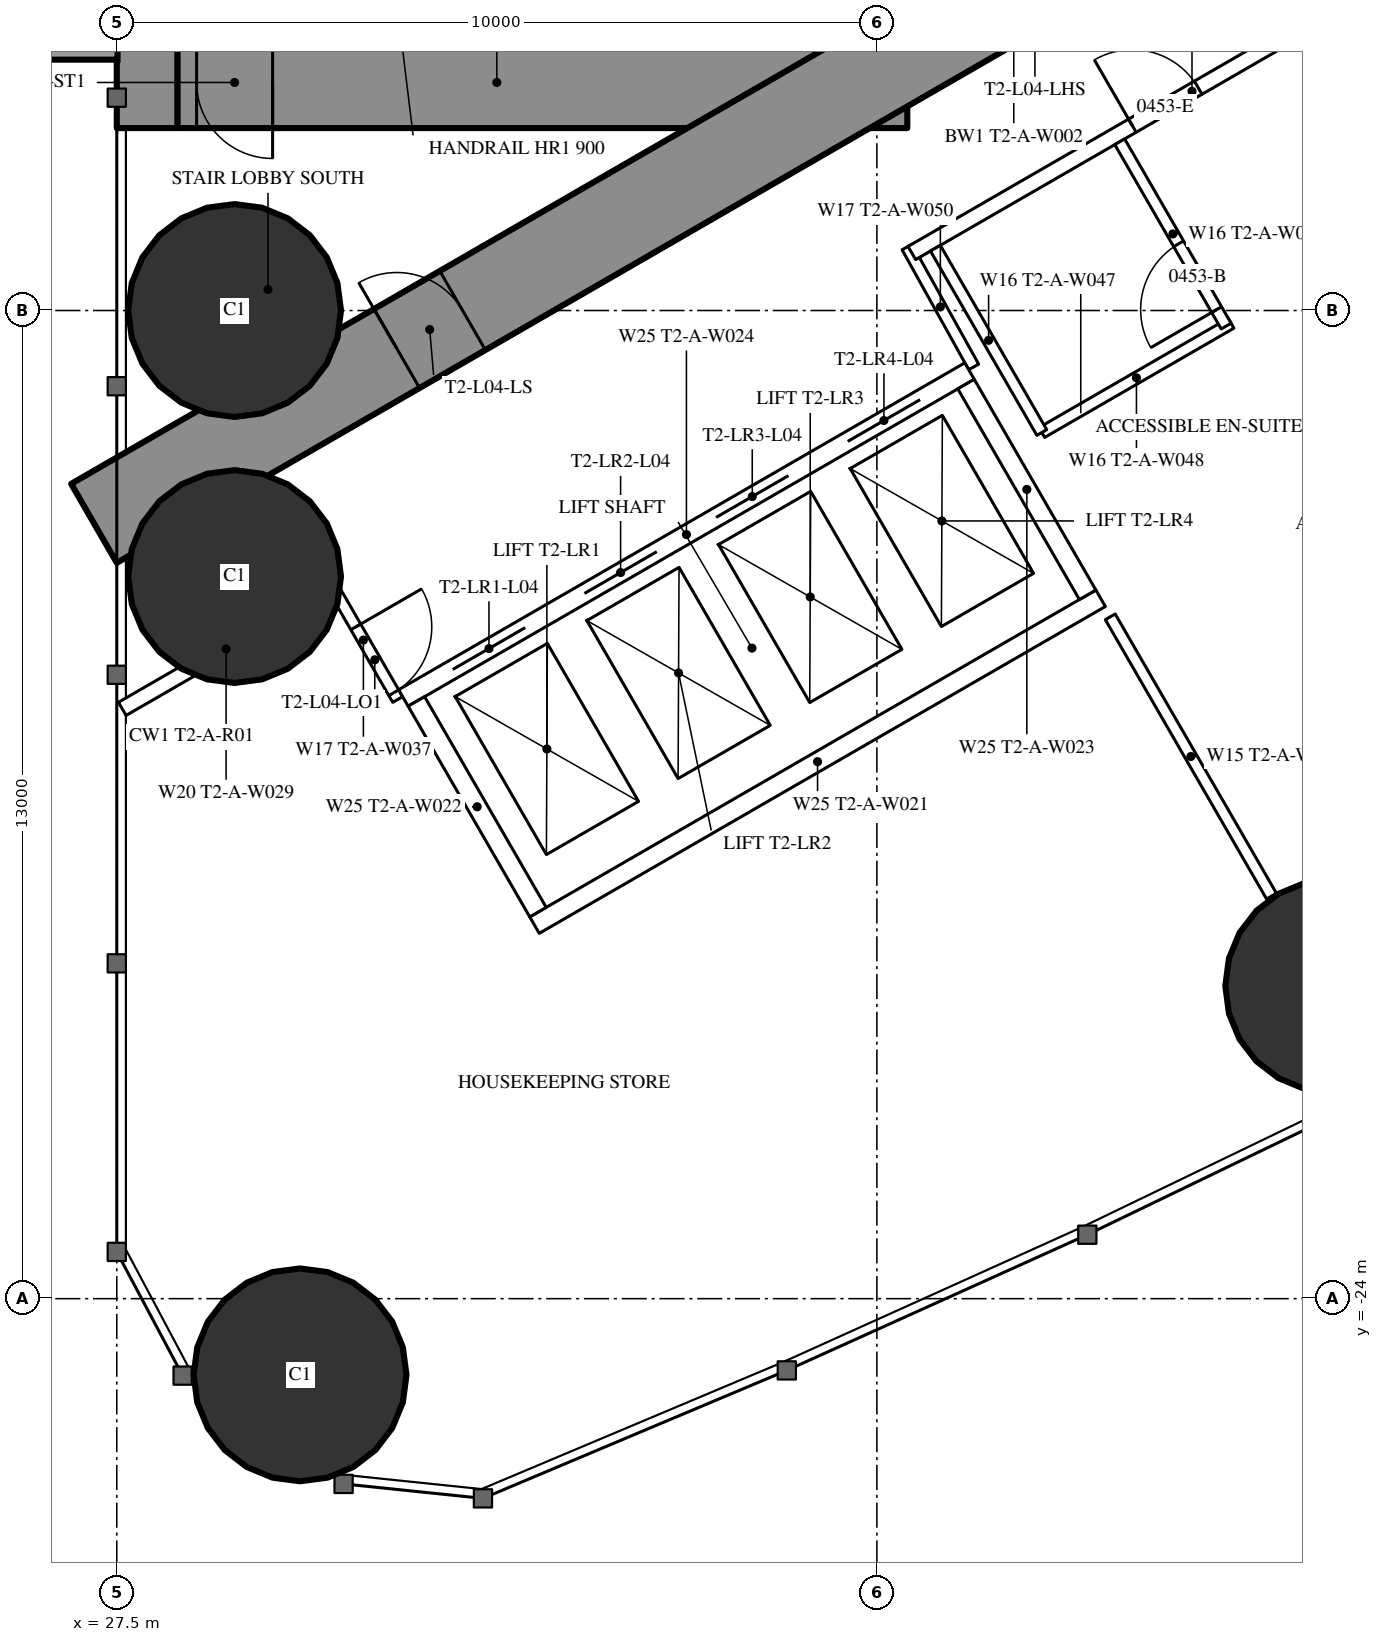
"""IFC4 building model, lengths in metres.
Left out: names, types, materials, properties, quantities, classifications, styles, units other than length and angle.
Written with IfcOpenShell. Run it as: python <this file> out.ifc"""

import sys

from ifc_helpers import new_model, si_unit, direction, frame, frame_2d, origin, origin_2d, place, context, subcontext, project, spatial, rectangle, hollow_circle, extrude, element, fill, save


model = new_model("IFC4")
c1 = context("Model", 3, precision=1e-05, world=origin(), true_north=direction((0.0, 1.0)))
c2 = subcontext(c1, "Body", "Model", "MODEL_VIEW")
j1 = project(units=[si_unit("LENGTHUNIT", "METRE"), si_unit("PLANEANGLEUNIT", "RADIAN")], contexts=[c1])
p1 = place(None, origin())
s1 = spatial("IfcSite", under=j1, at=p1, CompositionType="ELEMENT")
p2 = place(p1, origin())
s2 = spatial("IfcBuilding", under=s1, at=p2, CompositionType="ELEMENT")
p3 = place(p2, frame((0.0, 0.0, 21.5)))
s3 = spatial("IfcBuildingStorey", under=s2, at=p3, CompositionType="ELEMENT", Elevation=21.5)
for number, where, z_axis, x_axis in (
    (1, (29.911, -25.002, 0.0), (0.0, 0.0, 1.0), (1.0, 0.0, 0.0)),
    (2, (29.05, -11.0, 0.0), (0.0, 0.0, 1.0), (1.0, 0.0, 0.0)),
    (3, (29.05, -14.5, 0.0), (0.0, 0.0, 1.0), (1.0, 0.0, 0.0)),
    (4, (43.484, -19.886, 0.0), (0.0, 0.0, 1.0), (1.0, 0.0, 0.0)),
):
    element("IfcColumn", number, at=place(p3, frame(where, z_axis=z_axis, x_axis=x_axis)), inside=s3, PredefinedType="COLUMN", context=c2, shape_type="SweptSolid", body=[
        extrude(hollow_circle(Radius=1.4, WallThickness=0.12, at=origin_2d()), origin(), (0.0, 0.0, 1.0), 3.5),
    ])
p4 = place(p3, frame((27.9, -8.6, 0.0), z_axis=(0.0, 0.0, 1.0), x_axis=(0.0, 1.0, 0.0)))
e5 = element("IfcWall", 5, at=p4, inside=s3, PredefinedType="SHEAR", context=c2, shape_type="SweptSolid", body=[
    extrude(rectangle(XDim=17.2, YDim=0.8, at=frame_2d((8.6, 0.0))), origin(), (0.0, 0.0, 1.0), 3.5),
])
p5 = place(p4, frame((2.45, 0.0, 0.6)))
e6 = element("IfcOpeningElement", 6, at=p5, cuts=e5, PredefinedType="OPENING", context=c2, shape_type="SweptSolid", body=[
    extrude(rectangle(XDim=0.6, YDim=2.1, at=frame_2d((0.3, 1.05))), frame((0.0, 0.41, 0.0), z_axis=(0.0, -1.0, 0.0), x_axis=(1.0, 0.0, 0.0)), (0.0, 0.0, 1.0), 0.82),
])
p6 = place(p4, frame((14.15, 0.0, 0.6)))
e7 = element("IfcOpeningElement", 7, at=p6, cuts=e5, PredefinedType="OPENING", context=c2, shape_type="SweptSolid", body=[
    extrude(rectangle(XDim=0.6, YDim=2.1, at=frame_2d((0.3, 1.05))), frame((0.0, 0.41, 0.0), z_axis=(0.0, -1.0, 0.0), x_axis=(1.0, 0.0, 0.0)), (0.0, 0.0, 1.0), 0.82),
])
p7 = place(p3, frame((37.3, -8.6, 0.0), z_axis=(0.0, 0.0, 1.0), x_axis=(0.0, 1.0, 0.0)))
e8 = element("IfcWall", 8, at=p7, inside=s3, PredefinedType="SHEAR", context=c2, shape_type="SweptSolid", body=[
    extrude(rectangle(XDim=17.2, YDim=1.2, at=frame_2d((8.6, 0.0))), origin(), (0.0, 0.0, 1.0), 3.5),
])
p8 = place(p7, frame((7.7, 0.0, 0.0)))
e9 = element("IfcOpeningElement", 9, at=p8, cuts=e8, PredefinedType="OPENING", context=c2, shape_type="SweptSolid", body=[
    extrude(rectangle(XDim=1.8, YDim=2.2, at=frame_2d((0.9, 1.1))), frame((0.0, 0.61, 0.0), z_axis=(0.0, -1.0, 0.0), x_axis=(1.0, 0.0, 0.0)), (0.0, 0.0, 1.0), 1.22),
])
p9 = place(p3, frame((28.3, -8.0, 0.0), z_axis=(0.0, 0.0, 1.0), x_axis=(1.0, 0.0, 0.0)))
e10 = element("IfcWall", 10, at=p9, inside=s3, PredefinedType="SHEAR", context=c2, shape_type="SweptSolid", body=[
    extrude(rectangle(XDim=8.4, YDim=1.2, at=frame_2d((4.2, 0.0))), origin(), (0.0, 0.0, 1.0), 3.5),
])
p10 = place(p9, frame((0.25, 0.0, 0.0)))
e11 = element("IfcOpeningElement", 11, at=p10, cuts=e10, PredefinedType="OPENING", context=c2, shape_type="SweptSolid", body=[
    extrude(rectangle(XDim=1.0, YDim=2.2, at=frame_2d((0.5, 1.1))), frame((0.0, 0.61, 0.0), z_axis=(0.0, -1.0, 0.0), x_axis=(1.0, 0.0, 0.0)), (0.0, 0.0, 1.0), 1.22),
])
p11 = place(p3, frame((27.2, -13.8, 0.0), z_axis=(0.0, 0.0, 1.0), x_axis=(0.866027159892, 0.499996958321, 0.0)))
e12 = element("IfcWall", 12, at=p11, inside=s3, PredefinedType="SHEAR", context=c2, shape_type="SweptSolid", body=[
    extrude(rectangle(XDim=27.947, YDim=1.2, at=frame_2d((13.973, 0.0))), origin(), (0.0, 0.0, 1.0), 3.5),
])
p12 = place(p11, frame((4.6, 0.0, 0.0)))
e13 = element("IfcOpeningElement", 13, at=p12, cuts=e12, PredefinedType="OPENING", context=c2, shape_type="SweptSolid", body=[
    extrude(rectangle(XDim=1.0, YDim=2.2, at=frame_2d((0.5, 1.1))), frame((0.0, 0.61, 0.0), z_axis=(0.0, -1.0, 0.0), x_axis=(1.0, 0.0, 0.0)), (0.0, 0.0, 1.0), 1.22),
])
p13 = place(p11, frame((13.395, 0.0, 0.0)))
e14 = element("IfcOpeningElement", 14, at=p13, cuts=e12, PredefinedType="OPENING", context=c2, shape_type="SweptSolid", body=[
    extrude(rectangle(XDim=1.8, YDim=2.2, at=frame_2d((0.9, 1.1))), frame((0.0, 0.61, 0.0), z_axis=(0.0, -1.0, 0.0), x_axis=(1.0, 0.0, 0.0)), (0.0, 0.0, 1.0), 1.22),
])
p14 = place(p3, frame((40.57, -15.03, 0.0), z_axis=(0.0, 0.0, 1.0), x_axis=(0.500012993597, -0.866017901798, 0.0)))
e15 = element("IfcWall", 15, at=p14, inside=s3, PredefinedType="PARTITIONING", context=c2, shape_type="SweptSolid", body=[
    extrude(rectangle(XDim=4.243, YDim=0.15, at=frame_2d((2.122, 0.0))), origin(), (0.0, 0.0, 1.0), 3.25),
])
p15 = place(p3, frame((27.572, -16.241, 0.0), z_axis=(0.0, 0.0, 1.0), x_axis=(0.866029654818, 0.499992636921, 0.0)))
e16 = element("IfcWall", 16, at=p15, inside=s3, PredefinedType="PARTITIONING", context=c2, shape_type="SweptSolid", body=[
    extrude(rectangle(XDim=3.155, YDim=0.2, at=frame_2d((1.577, 0.0))), origin(), (0.0, 0.0, 1.0), 3.25),
])
p16 = place(p3, frame((38.773, -11.742, 0.0), z_axis=(0.0, 0.0, 1.0), x_axis=(-0.485528096672, 0.8742210632, 0.0)))
e17 = element("IfcWall", 17, at=p16, inside=s3, PredefinedType="PARTITIONING", context=c2, shape_type="SweptSolid", body=[
    extrude(rectangle(XDim=1.805, YDim=0.15, at=frame_2d((0.903, 0.0))), origin(), (0.0, 0.0, 1.0), 3.25),
])
p17 = place(p3, frame((30.293, -14.554, 0.0), z_axis=(0.0, 0.0, 1.0), x_axis=(0.499980071345, -0.866036909293, 0.0)))
e18 = element("IfcWall", 18, at=p17, inside=s3, PredefinedType="PARTITIONING", context=c2, shape_type="SweptSolid", body=[
    extrude(rectangle(XDim=1.805, YDim=0.15, at=frame_2d((0.902, 0.0))), origin(), (0.0, 0.0, 1.0), 3.25),
])
p18 = place(p17, frame((0.702, 0.0, 0.0)))
e19 = element("IfcOpeningElement", 19, at=p18, cuts=e18, PredefinedType="OPENING", context=c2, shape_type="SweptSolid", body=[
    extrude(rectangle(XDim=1.0, YDim=2.2, at=frame_2d((0.5, 1.1))), frame((0.0, 0.085, 0.0), z_axis=(0.0, -1.0, 0.0), x_axis=(1.0, 0.0, 0.0)), (0.0, 0.0, 1.0), 0.17),
])
p19 = place(p3, frame((37.96, -10.243, 0.0), z_axis=(0.0, 0.0, 1.0), x_axis=(0.866024617314, 0.500001362204, 0.0)))
e20 = element("IfcWall", 20, at=p19, inside=s3, PredefinedType="PARTITIONING", context=c2, shape_type="SweptSolid", body=[
    extrude(rectangle(XDim=8.512, YDim=0.2, at=frame_2d((4.256, 0.0))), origin(), (0.0, 0.0, 1.0), 3.25),
])
p20 = place(p19, frame((3.35, 0.0, 0.0)))
e21 = element("IfcOpeningElement", 21, at=p20, cuts=e20, PredefinedType="OPENING", context=c2, shape_type="SweptSolid", body=[
    extrude(rectangle(XDim=1.0, YDim=2.2, at=frame_2d((0.5, 1.1))), frame((0.0, 0.11, 0.0), z_axis=(0.0, -1.0, 0.0), x_axis=(1.0, 0.0, 0.0)), (0.0, 0.0, 1.0), 0.22),
])
p21 = place(p3, frame((39.67, -12.605, 0.0), z_axis=(0.0, 0.0, 1.0), x_axis=(0.866018712932, 0.500011588718, 0.0)))
e22 = element("IfcWall", 22, at=p21, inside=s3, PredefinedType="PARTITIONING", context=c2, shape_type="SweptSolid", body=[
    extrude(rectangle(XDim=2.875, YDim=0.15, at=frame_2d((1.438, 0.0))), origin(), (0.0, 0.0, 1.0), 3.25),
])
p22 = place(p3, frame((40.695, -8.78, 0.0), z_axis=(0.0, 0.0, 1.0), x_axis=(0.500049511043, -0.865996816683, 0.0)))
e23 = element("IfcWall", 23, at=p22, inside=s3, PredefinedType="PARTITIONING", context=c2, shape_type="SweptSolid", body=[
    extrude(rectangle(XDim=2.8, YDim=0.15, at=frame_2d((1.4, 0.0))), origin(), (0.0, 0.0, 1.0), 3.25),
])
p23 = place(p22, frame((1.55, 0.0, 0.0)))
e24 = element("IfcOpeningElement", 24, at=p23, cuts=e23, PredefinedType="OPENING", context=c2, shape_type="SweptSolid", body=[
    extrude(rectangle(XDim=1.0, YDim=2.2, at=frame_2d((0.5, 1.1))), frame((0.0, 0.085, 0.0), z_axis=(0.0, -1.0, 0.0), x_axis=(1.0, 0.0, 0.0)), (0.0, 0.0, 1.0), 0.17),
])
p24 = place(p3, frame((38.27, -10.18, 0.0), z_axis=(0.0, 0.0, 1.0), x_axis=(0.500049511043, -0.865996816683, 0.0)))
e25 = element("IfcWall", 25, at=p24, inside=s3, PredefinedType="PARTITIONING", context=c2, shape_type="SweptSolid", body=[
    extrude(rectangle(XDim=2.8, YDim=0.15, at=frame_2d((1.4, 0.0))), origin(), (0.0, 0.0, 1.0), 3.25),
])
p25 = place(p3, frame((31.271, -16.097, 0.0), z_axis=(0.0, 0.0, 1.0), x_axis=(0.86604045752, 0.499973925258, 0.0)))
e26 = element("IfcWall", 26, at=p25, inside=s3, PredefinedType="PARTITIONING", context=c2, shape_type="SweptSolid", body=[
    extrude(rectangle(XDim=8.6, YDim=0.25, at=frame_2d((4.3, 0.0))), origin(), (0.0, 0.0, 1.0), 3.25),
])
p26 = place(p25, frame((0.75, 0.0, 0.0)))
e27 = element("IfcOpeningElement", 27, at=p26, cuts=e26, PredefinedType="OPENING", context=c2, shape_type="SweptSolid", body=[
    extrude(rectangle(XDim=1.1, YDim=2.2, at=frame_2d((0.55, 1.1))), frame((0.0, 0.135, 0.0), z_axis=(0.0, -1.0, 0.0), x_axis=(1.0, 0.0, 0.0)), (0.0, 0.0, 1.0), 0.27),
])
p27 = place(p25, frame((2.75, 0.0, 0.0)))
e28 = element("IfcOpeningElement", 28, at=p27, cuts=e26, PredefinedType="OPENING", context=c2, shape_type="SweptSolid", body=[
    extrude(rectangle(XDim=1.1, YDim=2.2, at=frame_2d((0.55, 1.1))), frame((0.0, 0.135, 0.0), z_axis=(0.0, -1.0, 0.0), x_axis=(1.0, 0.0, 0.0)), (0.0, 0.0, 1.0), 0.27),
])
p28 = place(p25, frame((4.75, 0.0, 0.0)))
e29 = element("IfcOpeningElement", 29, at=p28, cuts=e26, PredefinedType="OPENING", context=c2, shape_type="SweptSolid", body=[
    extrude(rectangle(XDim=1.1, YDim=2.2, at=frame_2d((0.55, 1.1))), frame((0.0, 0.135, 0.0), z_axis=(0.0, -1.0, 0.0), x_axis=(1.0, 0.0, 0.0)), (0.0, 0.0, 1.0), 0.27),
])
p29 = place(p25, frame((6.75, 0.0, 0.0)))
e30 = element("IfcOpeningElement", 30, at=p29, cuts=e26, PredefinedType="OPENING", context=c2, shape_type="SweptSolid", body=[
    extrude(rectangle(XDim=1.1, YDim=2.2, at=frame_2d((0.55, 1.1))), frame((0.0, 0.135, 0.0), z_axis=(0.0, -1.0, 0.0), x_axis=(1.0, 0.0, 0.0)), (0.0, 0.0, 1.0), 0.27),
])
p30 = place(p3, frame((32.996, -19.086, 0.0), z_axis=(0.0, 0.0, 1.0), x_axis=(0.866028165386, 0.499995216735, 0.0)))
e31 = element("IfcWall", 31, at=p30, inside=s3, PredefinedType="PARTITIONING", context=c2, shape_type="SweptSolid", body=[
    extrude(rectangle(XDim=8.6, YDim=0.25, at=frame_2d((4.3, 0.0))), origin(), (0.0, 0.0, 1.0), 3.25),
])
for number, where, z_axis, x_axis in (
    (32, (31.441, -16.143, 0.0), (0.0, 0.0, 1.0), (0.5, -0.866, 0.0)),
    (33, (38.673, -11.968, 0.0), (0.0, 0.0, 1.0), (0.5, -0.866, 0.0)),
):
    element("IfcWall", number, at=place(p3, frame(where, z_axis=z_axis, x_axis=x_axis)), inside=s3, PredefinedType="PARTITIONING", context=c2, shape_type="SweptSolid", body=[
        extrude(rectangle(XDim=3.201, YDim=0.25, at=frame_2d((1.6, 0.0))), origin(), (0.0, 0.0, 1.0), 3.25),
    ])
p31 = place(p23, origin())
e34 = element("IfcDoor", 34, at=p31, inside=s3, OperationType="SINGLE_SWING_RIGHT", PredefinedType="DOOR", context=c2, shape_type="SweptSolid", body=[
    extrude(rectangle(XDim=1.0, YDim=2.2, at=frame_2d((0.5, 1.1))), frame((0.0, 0.025, 0.0), z_axis=(0.0, -1.0, 0.0), x_axis=(1.0, 0.0, 0.0)), (0.0, 0.0, 1.0), 0.05),
])
fill(e24, e34)
p32 = place(p20, origin())
e35 = element("IfcDoor", 35, at=p32, inside=s3, OperationType="SINGLE_SWING_LEFT", PredefinedType="DOOR", context=c2, shape_type="SweptSolid", body=[
    extrude(rectangle(XDim=1.0, YDim=2.2, at=frame_2d((0.5, 1.1))), frame((0.0, 0.025, 0.0), z_axis=(0.0, -1.0, 0.0), x_axis=(1.0, 0.0, 0.0)), (0.0, 0.0, 1.0), 0.05),
])
fill(e21, e35)
p33 = place(p18, origin())
e36 = element("IfcDoor", 36, at=p33, inside=s3, OperationType="SINGLE_SWING_LEFT", PredefinedType="DOOR", context=c2, shape_type="SweptSolid", body=[
    extrude(rectangle(XDim=1.0, YDim=2.2, at=frame_2d((0.5, 1.1))), frame((0.0, 0.025, 0.0), z_axis=(0.0, -1.0, 0.0), x_axis=(1.0, 0.0, 0.0)), (0.0, 0.0, 1.0), 0.05),
])
fill(e19, e36)
p34 = place(p12, origin())
e37 = element("IfcDoor", 37, at=p34, inside=s3, OperationType="SINGLE_SWING_LEFT", PredefinedType="DOOR", context=c2, shape_type="SweptSolid", body=[
    extrude(rectangle(XDim=1.0, YDim=2.2, at=frame_2d((0.5, 1.1))), frame((0.0, 0.025, 0.0), z_axis=(0.0, -1.0, 0.0), x_axis=(1.0, 0.0, 0.0)), (0.0, 0.0, 1.0), 0.05),
])
fill(e13, e37)
p35 = place(p10, origin())
e38 = element("IfcDoor", 38, at=p35, inside=s3, OperationType="SINGLE_SWING_RIGHT", PredefinedType="DOOR", context=c2, shape_type="SweptSolid", body=[
    extrude(rectangle(XDim=1.0, YDim=2.2, at=frame_2d((0.5, 1.1))), frame((0.0, 0.025, 0.0), z_axis=(0.0, -1.0, 0.0), x_axis=(1.0, 0.0, 0.0)), (0.0, 0.0, 1.0), 0.05),
])
fill(e11, e38)
p36 = place(p26, origin())
e39 = element("IfcDoor", 39, at=p36, inside=s3, OperationType="DOUBLE_DOOR_SLIDING", PredefinedType="USERDEFINED", context=c2, shape_type="SweptSolid", body=[
    extrude(rectangle(XDim=1.1, YDim=2.2, at=frame_2d((0.55, 1.1))), frame((0.0, 0.025, 0.0), z_axis=(0.0, -1.0, 0.0), x_axis=(1.0, 0.0, 0.0)), (0.0, 0.0, 1.0), 0.05),
])
fill(e27, e39)
p37 = place(p27, origin())
e40 = element("IfcDoor", 40, at=p37, inside=s3, OperationType="DOUBLE_DOOR_SLIDING", PredefinedType="USERDEFINED", context=c2, shape_type="SweptSolid", body=[
    extrude(rectangle(XDim=1.1, YDim=2.2, at=frame_2d((0.55, 1.1))), frame((0.0, 0.025, 0.0), z_axis=(0.0, -1.0, 0.0), x_axis=(1.0, 0.0, 0.0)), (0.0, 0.0, 1.0), 0.05),
])
fill(e28, e40)
p38 = place(p28, origin())
e41 = element("IfcDoor", 41, at=p38, inside=s3, OperationType="DOUBLE_DOOR_SLIDING", PredefinedType="USERDEFINED", context=c2, shape_type="SweptSolid", body=[
    extrude(rectangle(XDim=1.1, YDim=2.2, at=frame_2d((0.55, 1.1))), frame((0.0, 0.025, 0.0), z_axis=(0.0, -1.0, 0.0), x_axis=(1.0, 0.0, 0.0)), (0.0, 0.0, 1.0), 0.05),
])
fill(e29, e41)
p39 = place(p29, origin())
e42 = element("IfcDoor", 42, at=p39, inside=s3, OperationType="DOUBLE_DOOR_SLIDING", PredefinedType="USERDEFINED", context=c2, shape_type="SweptSolid", body=[
    extrude(rectangle(XDim=1.1, YDim=2.2, at=frame_2d((0.55, 1.1))), frame((0.0, 0.025, 0.0), z_axis=(0.0, -1.0, 0.0), x_axis=(1.0, 0.0, 0.0)), (0.0, 0.0, 1.0), 0.05),
])
fill(e30, e42)
save(model, sys.argv[1])
